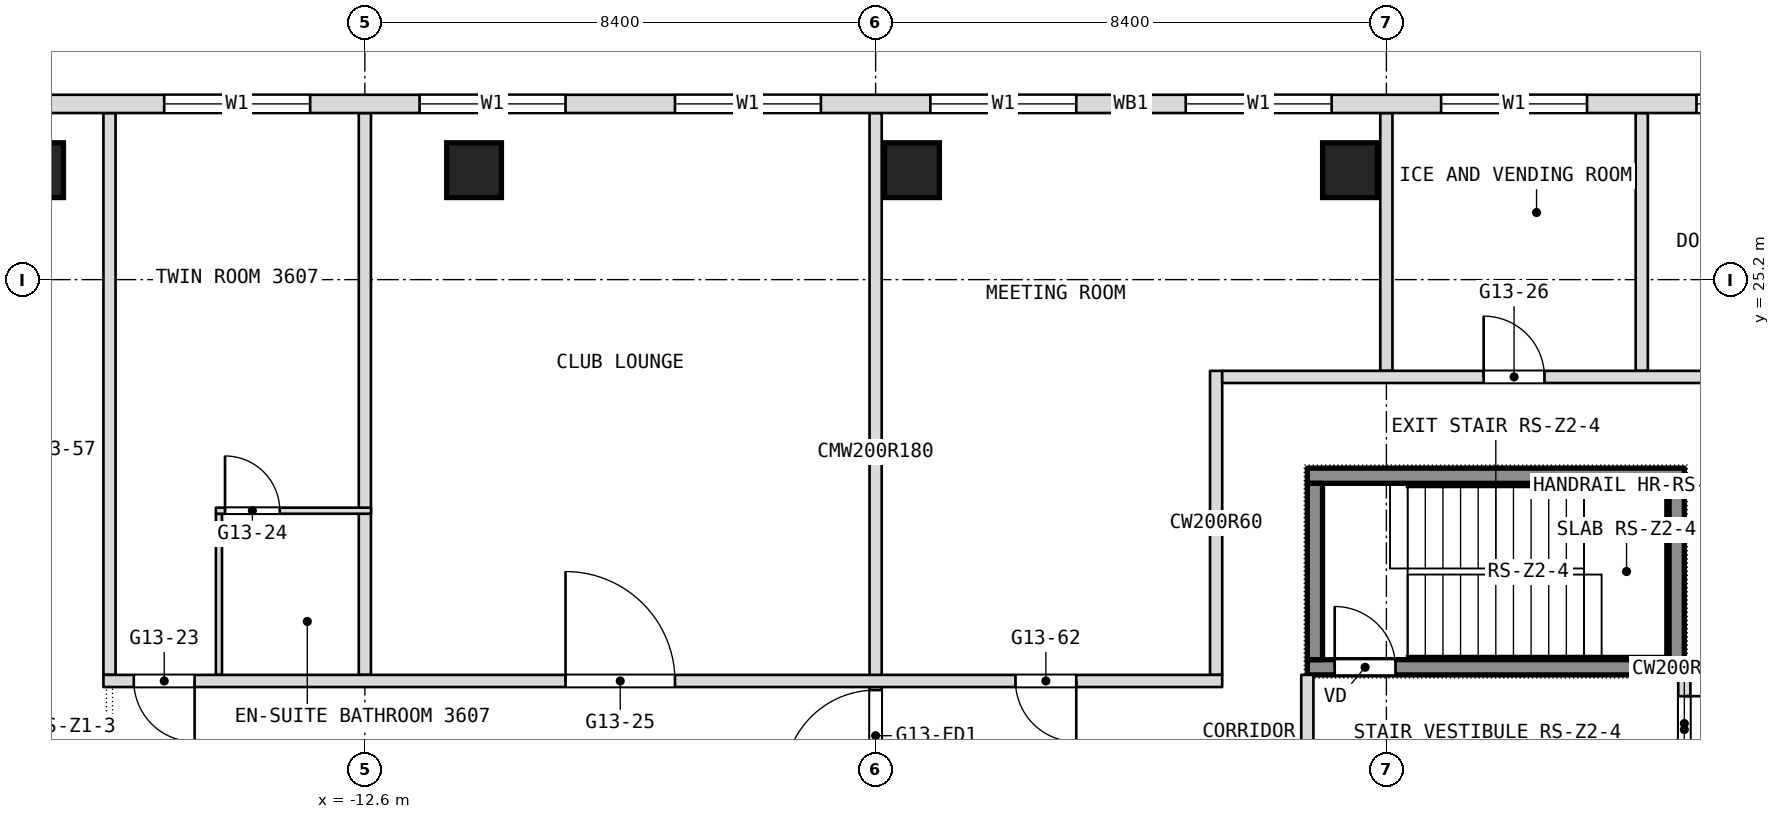
"""IFC4 building model, lengths in metres.
Left out: names, types, materials, properties, quantities, classifications, styles, units other than length and angle.
Written with IfcOpenShell. Run it as: python <this file> out.ifc"""

import sys

from ifc_helpers import new_model, si_unit, direction, frame, frame_2d, origin, origin_2d, place, context, subcontext, project, spatial, rectangle, extrude, element, fill, save


model = new_model("IFC4")
c1 = context("Model", 3, precision=1e-05, world=origin(), true_north=direction((0.0, 1.0)))
c2 = subcontext(c1, "Body", "Model", "MODEL_VIEW")
j1 = project(units=[si_unit("LENGTHUNIT", "METRE"), si_unit("PLANEANGLEUNIT", "RADIAN")], contexts=[c1])
p1 = place(None, origin())
s1 = spatial("IfcSite", under=j1, at=p1, CompositionType="ELEMENT")
p2 = place(p1, origin())
s2 = spatial("IfcBuilding", under=s1, at=p2, CompositionType="ELEMENT")
p3 = place(p2, frame((0.0, 0.0, 155.3)))
s3 = spatial("IfcBuildingStorey", under=s2, at=p3, CompositionType="ELEMENT", Elevation=155.3)
for number, where, z_axis, x_axis in (
    (1, (-18.007, 27.0, 0.0), (0.0, 0.0, 1.0), (1.0, 0.0, 0.0)),
    (2, (-10.804, 27.0, 0.0), (0.0, 0.0, 1.0), (1.0, 0.0, 0.0)),
    (3, (-3.601, 27.0, 0.0), (0.0, 0.0, 1.0), (1.0, 0.0, 0.0)),
    (4, (3.601, 27.0, 0.0), (0.0, 0.0, 1.0), (1.0, 0.0, 0.0)),
):
    element("IfcColumn", number, at=place(p3, frame(where, z_axis=z_axis, x_axis=x_axis)), inside=s3, PredefinedType="COLUMN", context=c2, shape_type="SweptSolid", body=[
        extrude(rectangle(XDim=0.9, YDim=0.9, at=origin_2d()), origin(), (0.0, 0.0, 1.0), 3.6),
    ])
p4 = place(p3, frame((9.1, 16.9, 0.0), z_axis=(0.0, 0.0, 1.0), x_axis=(0.0, 1.0, 0.0)))
e5 = element("IfcWall", 5, at=p4, inside=s3, PredefinedType="PARTITIONING", context=c2, shape_type="SweptSolid", body=[
    extrude(rectangle(XDim=1.8, YDim=0.2, at=frame_2d((0.9, 0.0))), origin(), (0.0, 0.0, 1.0), 3.34),
])
p5 = place(p4, frame((0.55, 0.0, 0.0)))
e6 = element("IfcOpeningElement", 6, at=p5, cuts=e5, PredefinedType="OPENING", context=c2, shape_type="SweptSolid", body=[
    extrude(rectangle(XDim=0.9, YDim=2.1, at=frame_2d((0.45, 1.05))), frame((0.0, 0.1, 0.0), z_axis=(0.0, -1.0, 0.0), x_axis=(1.0, 0.0, 0.0)), (0.0, 0.0, 1.0), 0.2),
])
for number, where, z_axis, x_axis in (
    (7, (8.4, 23.7, 0.0), (0.0, 0.0, 1.0), (0.0, 1.0, 0.0)),
    (8, (4.2, 23.7, 0.0), (0.0, 0.0, 1.0), (0.0, 1.0, 0.0)),
):
    element("IfcWall", number, at=place(p3, frame(where, z_axis=z_axis, x_axis=x_axis)), inside=s3, PredefinedType="PARTITIONING", context=c2, shape_type="SweptSolid", body=[
        extrude(rectangle(XDim=4.24, YDim=0.2, at=frame_2d((2.12, 0.0))), origin(), (0.0, 0.0, 1.0), 3.34),
    ])
p6 = place(p3, frame((2.9, 16.9, 0.0), z_axis=(0.0, 0.0, 1.0), x_axis=(0.0, 1.0, 0.0)))
e9 = element("IfcWall", 9, at=p6, inside=s3, PredefinedType="PARTITIONING", context=c2, shape_type="SweptSolid", body=[
    extrude(rectangle(XDim=1.8, YDim=0.2, at=frame_2d((0.9, 0.0))), origin(), (0.0, 0.0, 1.0), 3.34),
])
p7 = place(p3, frame((1.4, 18.7, 0.0), z_axis=(0.0, 0.0, 1.0), x_axis=(0.0, 1.0, 0.0)))
e10 = element("IfcWall", 10, at=p7, inside=s3, PredefinedType="PARTITIONING", context=c2, shape_type="SweptSolid", body=[
    extrude(rectangle(XDim=5.0, YDim=0.2, at=frame_2d((2.5, 0.0))), origin(), (0.0, 0.0, 1.0), 3.34),
])
p8 = place(p3, frame((-4.2, 16.8, 0.0), z_axis=(0.0, 0.0, 1.0), x_axis=(0.0, 1.0, 0.0)))
e11 = element("IfcWall", 11, at=p8, inside=s3, PredefinedType="PARTITIONING", context=c2, shape_type="SweptSolid", body=[
    extrude(rectangle(XDim=11.14, YDim=0.2, at=frame_2d((5.57, 0.0))), origin(), (0.0, 0.0, 1.0), 3.34),
])
p9 = place(p8, frame((0.15, 0.0, 0.0)))
e12 = element("IfcOpeningElement", 12, at=p9, cuts=e11, PredefinedType="OPENING", context=c2, shape_type="SweptSolid", body=[
    extrude(rectangle(XDim=1.5, YDim=2.1, at=frame_2d((0.75, 1.05))), frame((0.0, 0.1, 0.0), z_axis=(0.0, -1.0, 0.0), x_axis=(1.0, 0.0, 0.0)), (0.0, 0.0, 1.0), 0.2),
])
p10 = place(p3, frame((-12.6, 18.7, 0.0), z_axis=(0.0, 0.0, 1.0), x_axis=(0.0, 1.0, 0.0)))
e13 = element("IfcWall", 13, at=p10, inside=s3, PredefinedType="PARTITIONING", context=c2, shape_type="SweptSolid", body=[
    extrude(rectangle(XDim=9.24, YDim=0.2, at=frame_2d((4.62, 0.0))), origin(), (0.0, 0.0, 1.0), 3.34),
])
p11 = place(p3, frame((-15.0, 18.7, 0.0), z_axis=(0.0, 0.0, 1.0), x_axis=(0.0, 1.0, 0.0)))
e14 = element("IfcWall", 14, at=p11, inside=s3, PredefinedType="PARTITIONING", context=c2, shape_type="SweptSolid", body=[
    extrude(rectangle(XDim=2.65, YDim=0.1, at=frame_2d((1.325, 0.0))), origin(), (0.0, 0.0, 1.0), 3.34),
])
p12 = place(p3, frame((-16.8, 18.7, 0.0), z_axis=(0.0, 0.0, 1.0), x_axis=(0.0, 1.0, 0.0)))
e15 = element("IfcWall", 15, at=p12, inside=s3, PredefinedType="PARTITIONING", context=c2, shape_type="SweptSolid", body=[
    extrude(rectangle(XDim=9.24, YDim=0.2, at=frame_2d((4.62, 0.0))), origin(), (0.0, 0.0, 1.0), 3.34),
])
p13 = place(p3, frame((-16.9, 18.6, 0.0), z_axis=(0.0, 0.0, 1.0), x_axis=(1.0, 0.0, 0.0)))
e16 = element("IfcWall", 16, at=p13, inside=s3, PredefinedType="PARTITIONING", context=c2, shape_type="SweptSolid", body=[
    extrude(rectangle(XDim=18.4, YDim=0.2, at=frame_2d((9.2, 0.0))), origin(), (0.0, 0.0, 1.0), 3.34),
])
p14 = place(p13, frame((0.5, 0.0, 0.0)))
e17 = element("IfcOpeningElement", 17, at=p14, cuts=e16, PredefinedType="OPENING", context=c2, shape_type="SweptSolid", body=[
    extrude(rectangle(XDim=1.0, YDim=2.1, at=frame_2d((0.5, 1.05))), frame((0.0, 0.1, 0.0), z_axis=(0.0, -1.0, 0.0), x_axis=(1.0, 0.0, 0.0)), (0.0, 0.0, 1.0), 0.2),
])
p15 = place(p13, frame((7.6, 0.0, 0.0)))
e18 = element("IfcOpeningElement", 18, at=p15, cuts=e16, PredefinedType="OPENING", context=c2, shape_type="SweptSolid", body=[
    extrude(rectangle(XDim=1.8, YDim=2.1, at=frame_2d((0.9, 1.05))), frame((0.0, 0.1, 0.0), z_axis=(0.0, -1.0, 0.0), x_axis=(1.0, 0.0, 0.0)), (0.0, 0.0, 1.0), 0.2),
])
p16 = place(p13, frame((15.0, 0.0, 0.0)))
e19 = element("IfcOpeningElement", 19, at=p16, cuts=e16, PredefinedType="OPENING", context=c2, shape_type="SweptSolid", body=[
    extrude(rectangle(XDim=1.0, YDim=2.1, at=frame_2d((0.5, 1.05))), frame((0.0, 0.1, 0.0), z_axis=(0.0, -1.0, 0.0), x_axis=(1.0, 0.0, 0.0)), (0.0, 0.0, 1.0), 0.2),
])
p17 = place(p3, frame((-15.05, 21.4, 0.0), z_axis=(0.0, 0.0, 1.0), x_axis=(1.0, 0.0, 0.0)))
e20 = element("IfcWall", 20, at=p17, inside=s3, PredefinedType="PARTITIONING", context=c2, shape_type="SweptSolid", body=[
    extrude(rectangle(XDim=2.55, YDim=0.1, at=frame_2d((1.275, 0.0))), origin(), (0.0, 0.0, 1.0), 3.34),
])
p18 = place(p17, frame((0.15, 0.0, 0.0)))
e21 = element("IfcOpeningElement", 21, at=p18, cuts=e20, PredefinedType="OPENING", context=c2, shape_type="SweptSolid", body=[
    extrude(rectangle(XDim=0.9, YDim=2.1, at=frame_2d((0.45, 1.05))), frame((0.0, 0.05, 0.0), z_axis=(0.0, -1.0, 0.0), x_axis=(1.0, 0.0, 0.0)), (0.0, 0.0, 1.0), 0.1),
])
p19 = place(p3, frame((1.5, 23.6, 0.0), z_axis=(0.0, 0.0, 1.0), x_axis=(1.0, 0.0, 0.0)))
e22 = element("IfcWall", 22, at=p19, inside=s3, PredefinedType="PARTITIONING", context=c2, shape_type="SweptSolid", body=[
    extrude(rectangle(XDim=9.2, YDim=0.2, at=frame_2d((4.6, 0.0))), origin(), (0.0, 0.0, 1.0), 3.34),
])
p20 = place(p19, frame((4.3, 0.0, 0.0)))
e23 = element("IfcOpeningElement", 23, at=p20, cuts=e22, PredefinedType="OPENING", context=c2, shape_type="SweptSolid", body=[
    extrude(rectangle(XDim=1.0, YDim=2.1, at=frame_2d((0.5, 1.05))), frame((0.0, 0.1, 0.0), z_axis=(0.0, -1.0, 0.0), x_axis=(1.0, 0.0, 0.0)), (0.0, 0.0, 1.0), 0.2),
])
p21 = place(p3, frame((21.306, 28.09, 0.0), z_axis=(0.0, 0.0, 1.0), x_axis=(-1.0, 0.0, 0.0)))
e24 = element("IfcWall", 24, at=p21, inside=s3, PredefinedType="NOTDEFINED", context=c2, shape_type="SweptSolid", body=[
    extrude(rectangle(XDim=42.612, YDim=0.3, at=frame_2d((21.306, 0.0))), origin(), (0.0, 0.0, 1.0), 3.6),
])
p22 = place(p21, frame((5.406, 0.0, 0.9)))
e25 = element("IfcOpeningElement", 25, at=p22, cuts=e24, PredefinedType="OPENING", context=c2, shape_type="SweptSolid", body=[
    extrude(rectangle(XDim=2.4, YDim=2.1, at=frame_2d((1.2, 1.05))), frame((0.0, 0.15, 0.0), z_axis=(0.0, -1.0, 0.0), x_axis=(1.0, 0.0, 0.0)), (0.0, 0.0, 1.0), 0.3),
])
p23 = place(p21, frame((9.606, 0.0, 0.9)))
e26 = element("IfcOpeningElement", 26, at=p23, cuts=e24, PredefinedType="OPENING", context=c2, shape_type="SweptSolid", body=[
    extrude(rectangle(XDim=2.4, YDim=2.1, at=frame_2d((1.2, 1.05))), frame((0.0, 0.15, 0.0), z_axis=(0.0, -1.0, 0.0), x_axis=(1.0, 0.0, 0.0)), (0.0, 0.0, 1.0), 0.3),
])
p24 = place(p21, frame((13.806, 0.0, 0.9)))
e27 = element("IfcOpeningElement", 27, at=p24, cuts=e24, PredefinedType="OPENING", context=c2, shape_type="SweptSolid", body=[
    extrude(rectangle(XDim=2.4, YDim=2.1, at=frame_2d((1.2, 1.05))), frame((0.0, 0.15, 0.0), z_axis=(0.0, -1.0, 0.0), x_axis=(1.0, 0.0, 0.0)), (0.0, 0.0, 1.0), 0.3),
])
p25 = place(p21, frame((18.006, 0.0, 0.9)))
e28 = element("IfcOpeningElement", 28, at=p25, cuts=e24, PredefinedType="OPENING", context=c2, shape_type="SweptSolid", body=[
    extrude(rectangle(XDim=2.4, YDim=2.1, at=frame_2d((1.2, 1.05))), frame((0.0, 0.15, 0.0), z_axis=(0.0, -1.0, 0.0), x_axis=(1.0, 0.0, 0.0)), (0.0, 0.0, 1.0), 0.3),
])
p26 = place(p21, frame((22.206, 0.0, 0.9)))
e29 = element("IfcOpeningElement", 29, at=p26, cuts=e24, PredefinedType="OPENING", context=c2, shape_type="SweptSolid", body=[
    extrude(rectangle(XDim=2.4, YDim=2.1, at=frame_2d((1.2, 1.05))), frame((0.0, 0.15, 0.0), z_axis=(0.0, -1.0, 0.0), x_axis=(1.0, 0.0, 0.0)), (0.0, 0.0, 1.0), 0.3),
])
p27 = place(p21, frame((26.406, 0.0, 0.9)))
e30 = element("IfcOpeningElement", 30, at=p27, cuts=e24, PredefinedType="OPENING", context=c2, shape_type="SweptSolid", body=[
    extrude(rectangle(XDim=2.4, YDim=2.1, at=frame_2d((1.2, 1.05))), frame((0.0, 0.15, 0.0), z_axis=(0.0, -1.0, 0.0), x_axis=(1.0, 0.0, 0.0)), (0.0, 0.0, 1.0), 0.3),
])
p28 = place(p21, frame((30.606, 0.0, 0.9)))
e31 = element("IfcOpeningElement", 31, at=p28, cuts=e24, PredefinedType="OPENING", context=c2, shape_type="SweptSolid", body=[
    extrude(rectangle(XDim=2.4, YDim=2.1, at=frame_2d((1.2, 1.05))), frame((0.0, 0.15, 0.0), z_axis=(0.0, -1.0, 0.0), x_axis=(1.0, 0.0, 0.0)), (0.0, 0.0, 1.0), 0.3),
])
p29 = place(p21, frame((34.806, 0.0, 0.9)))
e32 = element("IfcOpeningElement", 32, at=p29, cuts=e24, PredefinedType="OPENING", context=c2, shape_type="SweptSolid", body=[
    extrude(rectangle(XDim=2.4, YDim=2.1, at=frame_2d((1.2, 1.05))), frame((0.0, 0.15, 0.0), z_axis=(0.0, -1.0, 0.0), x_axis=(1.0, 0.0, 0.0)), (0.0, 0.0, 1.0), 0.3),
])
p30 = place(p3, frame((2.9, 18.825, 0.1), z_axis=(0.0, 0.0, 1.0), x_axis=(1.0, 0.0, 0.0)))
e33 = element("IfcWall", 33, at=p30, inside=s3, PredefinedType="SHEAR", context=c2, shape_type="SweptSolid", body=[
    extrude(rectangle(XDim=6.2, YDim=0.25, at=frame_2d((3.1, 0.0))), origin(), (0.0, 0.0, 1.0), 3.6),
])
p31 = place(p30, frame((0.45, 0.0, 0.0)))
e34 = element("IfcOpeningElement", 34, at=p31, cuts=e33, PredefinedType="OPENING", context=c2, shape_type="SweptSolid", body=[
    extrude(rectangle(XDim=1.0, YDim=2.1, at=frame_2d((0.5, 1.05))), frame((0.0, 0.125, 0.0), z_axis=(0.0, -1.0, 0.0), x_axis=(1.0, 0.0, 0.0)), (0.0, 0.0, 1.0), 0.25),
])
p32 = place(p3, frame((2.9, 21.975, 0.1), z_axis=(0.0, 0.0, 1.0), x_axis=(1.0, 0.0, 0.0)))
e35 = element("IfcWall", 35, at=p32, inside=s3, PredefinedType="SHEAR", context=c2, shape_type="SweptSolid", body=[
    extrude(rectangle(XDim=6.2, YDim=0.25, at=frame_2d((3.1, 0.0))), origin(), (0.0, 0.0, 1.0), 3.6),
])
for number, where, z_axis, x_axis in (
    (36, (3.025, 18.95, 0.1), (0.0, 0.0, 1.0), (0.0, 1.0, 0.0)),
    (37, (8.975, 18.95, 0.1), (0.0, 0.0, 1.0), (0.0, 1.0, 0.0)),
):
    element("IfcWall", number, at=place(p3, frame(where, z_axis=z_axis, x_axis=x_axis)), inside=s3, PredefinedType="SHEAR", context=c2, shape_type="SweptSolid", body=[
        extrude(rectangle(XDim=2.9, YDim=0.25, at=frame_2d((1.45, 0.0))), origin(), (0.0, 0.0, 1.0), 3.6),
    ])
p33 = place(p5, origin())
e38 = element("IfcDoor", 38, at=p33, inside=s3, OperationType="SINGLE_SWING_RIGHT", PredefinedType="DOOR", context=c2, shape_type="SweptSolid", body=[
    extrude(rectangle(XDim=0.9, YDim=2.1, at=frame_2d((0.45, 1.05))), frame((0.0, 0.025, 0.0), z_axis=(0.0, -1.0, 0.0), x_axis=(1.0, 0.0, 0.0)), (0.0, 0.0, 1.0), 0.05),
])
fill(e6, e38)
p34 = place(p14, origin())
e39 = element("IfcDoor", 39, at=p34, inside=s3, OperationType="SINGLE_SWING_RIGHT", PredefinedType="DOOR", context=c2, shape_type="SweptSolid", body=[
    extrude(rectangle(XDim=1.0, YDim=2.1, at=frame_2d((0.5, 1.05))), frame((0.0, 0.025, 0.0), z_axis=(0.0, -1.0, 0.0), x_axis=(1.0, 0.0, 0.0)), (0.0, 0.0, 1.0), 0.05),
])
fill(e17, e39)
p35 = place(p15, origin())
e40 = element("IfcDoor", 40, at=p35, inside=s3, OperationType="DOUBLE_DOOR_SINGLE_SWING", PredefinedType="DOOR", context=c2, shape_type="SweptSolid", body=[
    extrude(rectangle(XDim=1.8, YDim=2.1, at=frame_2d((0.9, 1.05))), frame((0.0, 0.025, 0.0), z_axis=(0.0, -1.0, 0.0), x_axis=(1.0, 0.0, 0.0)), (0.0, 0.0, 1.0), 0.05),
])
fill(e18, e40)
p36 = place(p16, origin())
e41 = element("IfcDoor", 41, at=p36, inside=s3, OperationType="SINGLE_SWING_LEFT", PredefinedType="DOOR", context=c2, shape_type="SweptSolid", body=[
    extrude(rectangle(XDim=1.0, YDim=2.1, at=frame_2d((0.5, 1.05))), frame((0.0, 0.025, 0.0), z_axis=(0.0, -1.0, 0.0), x_axis=(1.0, 0.0, 0.0)), (0.0, 0.0, 1.0), 0.05),
])
fill(e19, e41)
p37 = place(p18, origin())
e42 = element("IfcDoor", 42, at=p37, inside=s3, OperationType="SINGLE_SWING_RIGHT", PredefinedType="DOOR", context=c2, shape_type="SweptSolid", body=[
    extrude(rectangle(XDim=0.9, YDim=2.1, at=frame_2d((0.45, 1.05))), frame((0.0, 0.025, 0.0), z_axis=(0.0, -1.0, 0.0), x_axis=(1.0, 0.0, 0.0)), (0.0, 0.0, 1.0), 0.05),
])
fill(e21, e42)
p38 = place(p20, origin())
e43 = element("IfcDoor", 43, at=p38, inside=s3, OperationType="SINGLE_SWING_LEFT", PredefinedType="DOOR", context=c2, shape_type="SweptSolid", body=[
    extrude(rectangle(XDim=1.0, YDim=2.1, at=frame_2d((0.5, 1.05))), frame((0.0, 0.025, 0.0), z_axis=(0.0, -1.0, 0.0), x_axis=(1.0, 0.0, 0.0)), (0.0, 0.0, 1.0), 0.05),
])
fill(e23, e43)
p39 = place(p23, origin())
e44 = element("IfcWindow", 44, at=p39, inside=s3, PartitioningType="SINGLE_PANEL", PredefinedType="WINDOW", context=c2, shape_type="SweptSolid", body=[
    extrude(rectangle(XDim=2.4, YDim=2.1, at=frame_2d((1.2, 1.05))), frame((0.0, 0.03, 0.0), z_axis=(0.0, -1.0, 0.0), x_axis=(1.0, 0.0, 0.0)), (0.0, 0.0, 1.0), 0.06),
])
fill(e26, e44)
p40 = place(p24, origin())
e45 = element("IfcWindow", 45, at=p40, inside=s3, PartitioningType="SINGLE_PANEL", PredefinedType="WINDOW", context=c2, shape_type="SweptSolid", body=[
    extrude(rectangle(XDim=2.4, YDim=2.1, at=frame_2d((1.2, 1.05))), frame((0.0, 0.03, 0.0), z_axis=(0.0, -1.0, 0.0), x_axis=(1.0, 0.0, 0.0)), (0.0, 0.0, 1.0), 0.06),
])
fill(e27, e45)
p41 = place(p25, origin())
e46 = element("IfcWindow", 46, at=p41, inside=s3, PartitioningType="SINGLE_PANEL", PredefinedType="WINDOW", context=c2, shape_type="SweptSolid", body=[
    extrude(rectangle(XDim=2.4, YDim=2.1, at=frame_2d((1.2, 1.05))), frame((0.0, 0.03, 0.0), z_axis=(0.0, -1.0, 0.0), x_axis=(1.0, 0.0, 0.0)), (0.0, 0.0, 1.0), 0.06),
])
fill(e28, e46)
p42 = place(p26, origin())
e47 = element("IfcWindow", 47, at=p42, inside=s3, PartitioningType="SINGLE_PANEL", PredefinedType="WINDOW", context=c2, shape_type="SweptSolid", body=[
    extrude(rectangle(XDim=2.4, YDim=2.1, at=frame_2d((1.2, 1.05))), frame((0.0, 0.03, 0.0), z_axis=(0.0, -1.0, 0.0), x_axis=(1.0, 0.0, 0.0)), (0.0, 0.0, 1.0), 0.06),
])
fill(e29, e47)
p43 = place(p27, origin())
e48 = element("IfcWindow", 48, at=p43, inside=s3, PartitioningType="SINGLE_PANEL", PredefinedType="WINDOW", context=c2, shape_type="SweptSolid", body=[
    extrude(rectangle(XDim=2.4, YDim=2.1, at=frame_2d((1.2, 1.05))), frame((0.0, 0.03, 0.0), z_axis=(0.0, -1.0, 0.0), x_axis=(1.0, 0.0, 0.0)), (0.0, 0.0, 1.0), 0.06),
])
fill(e30, e48)
p44 = place(p28, origin())
e49 = element("IfcWindow", 49, at=p44, inside=s3, PartitioningType="SINGLE_PANEL", PredefinedType="WINDOW", context=c2, shape_type="SweptSolid", body=[
    extrude(rectangle(XDim=2.4, YDim=2.1, at=frame_2d((1.2, 1.05))), frame((0.0, 0.03, 0.0), z_axis=(0.0, -1.0, 0.0), x_axis=(1.0, 0.0, 0.0)), (0.0, 0.0, 1.0), 0.06),
])
fill(e31, e49)
p45 = place(p29, origin())
e50 = element("IfcWindow", 50, at=p45, inside=s3, PartitioningType="SINGLE_PANEL", PredefinedType="WINDOW", context=c2, shape_type="SweptSolid", body=[
    extrude(rectangle(XDim=2.4, YDim=2.1, at=frame_2d((1.2, 1.05))), frame((0.0, 0.03, 0.0), z_axis=(0.0, -1.0, 0.0), x_axis=(1.0, 0.0, 0.0)), (0.0, 0.0, 1.0), 0.06),
])
fill(e32, e50)
p46 = place(p31, origin())
e51 = element("IfcDoor", 51, at=p46, inside=s3, OperationType="SINGLE_SWING_LEFT", PredefinedType="DOOR", context=c2, shape_type="SweptSolid", body=[
    extrude(rectangle(XDim=1.0, YDim=2.1, at=frame_2d((0.5, 1.05))), frame((0.0, 0.025, 0.0), z_axis=(0.0, -1.0, 0.0), x_axis=(1.0, 0.0, 0.0)), (0.0, 0.0, 1.0), 0.05),
])
fill(e34, e51)
p47 = place(p9, origin())
e52 = element("IfcDoor", 52, at=p47, inside=s3, OperationType="DOUBLE_DOOR_DOUBLE_SWING", PredefinedType="DOOR", context=c2, shape_type="SweptSolid", body=[
    extrude(rectangle(XDim=1.5, YDim=2.1, at=frame_2d((0.75, 1.05))), frame((0.0, 0.025, 0.0), z_axis=(0.0, -1.0, 0.0), x_axis=(1.0, 0.0, 0.0)), (0.0, 0.0, 1.0), 0.05),
])
fill(e12, e52)
save(model, sys.argv[1])
